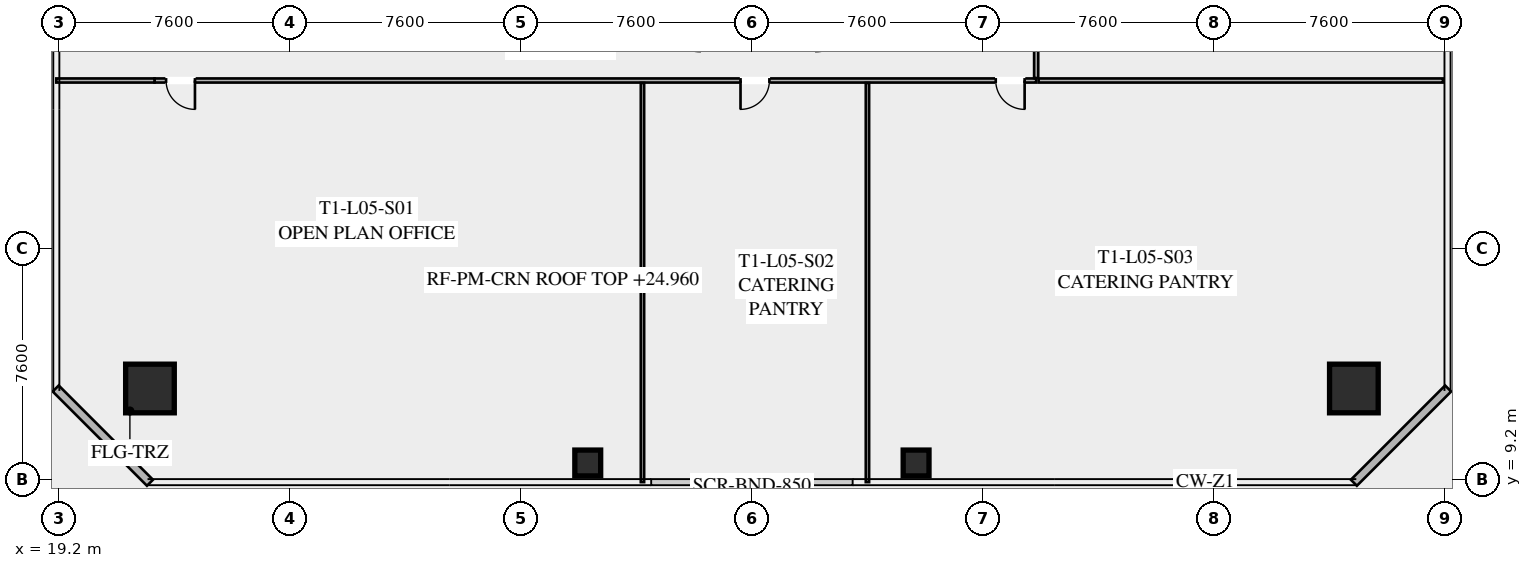
"""IFC4 building model, lengths in metres.
Left out: names, types, materials, properties, quantities, classifications, styles, units other than length and angle.
Written with IfcOpenShell. Run it as: python <this file> out.ifc"""

import sys

from ifc_helpers import new_model, si_unit, direction, frame, frame_2d, origin, origin_2d, place, context, subcontext, project, spatial, rectangle, hollow_rectangle, extrude, element, fill, save


model = new_model("IFC4")
c1 = context("Model", 3, precision=1e-05, world=origin(), true_north=direction((0.0, 1.0)))
c2 = subcontext(c1, "Body", "Model", "MODEL_VIEW")
j1 = project(units=[si_unit("LENGTHUNIT", "METRE"), si_unit("PLANEANGLEUNIT", "RADIAN")], contexts=[c1])
p1 = place(None, origin())
s1 = spatial("IfcSite", under=j1, at=p1, CompositionType="ELEMENT")
p2 = place(p1, origin())
s2 = spatial("IfcBuilding", under=s1, at=p2, CompositionType="ELEMENT")
p3 = place(p2, frame((0.0, 0.0, 24.6)))
s3 = spatial("IfcBuildingStorey", under=s2, at=p3, CompositionType="ELEMENT", Elevation=24.6)
for number, where, z_axis, x_axis in (
    (1, (22.2, 12.2, 0.0), (0.0, 0.0, 1.0), (1.0, 0.0, 0.0)),
    (2, (61.8, 12.2, 0.0), (0.0, 0.0, 1.0), (1.0, 0.0, 0.0)),
):
    element("IfcColumn", number, at=place(p3, frame(where, z_axis=z_axis, x_axis=x_axis)), inside=s3, PredefinedType="COLUMN", context=c2, shape_type="SweptSolid", body=[
        extrude(hollow_rectangle(XDim=1.6, YDim=1.6, WallThickness=0.06, at=origin_2d()), origin(), (0.0, 0.0, 1.0), 3.35),
    ])
for number, where, z_axis, x_axis in (
    (3, (36.6, 9.75, 0.0), (0.0, 0.0, 1.0), (1.0, 0.0, 0.0)),
    (4, (47.4, 9.75, 0.0), (0.0, 0.0, 1.0), (1.0, 0.0, 0.0)),
):
    element("IfcColumn", number, at=place(p3, frame(where, z_axis=z_axis, x_axis=x_axis)), inside=s3, PredefinedType="COLUMN", context=c2, shape_type="SweptSolid", body=[
        extrude(hollow_rectangle(XDim=0.85, YDim=0.85, WallThickness=0.035, at=origin_2d()), origin(), (0.0, 0.0, 1.0), 3.35),
    ])
for number, where, z_axis, x_axis in (
    (5, (22.2, 9.1, 0.0), (0.0, 0.0, 1.0), (-0.707, 0.707, 0.0)),
    (6, (64.9, 12.2, 0.0), (0.0, 0.0, 1.0), (-0.707, -0.707, 0.0)),
):
    element("IfcWall", number, at=place(p3, frame(where, z_axis=z_axis, x_axis=x_axis)), inside=s3, PredefinedType="SOLIDWALL", context=c2, shape_type="SweptSolid", body=[
        extrude(rectangle(XDim=4.384, YDim=0.28, at=frame_2d((2.192, 0.0))), origin(), (0.0, 0.0, 1.0), 3.35),
    ])
p4 = place(p3, frame((51.35, 22.33, 0.0), z_axis=(0.0, 0.0, 1.0), x_axis=(-1.0, 0.0, 0.0)))
e7 = element("IfcWall", 7, at=p4, inside=s3, PredefinedType="PARTITIONING", context=c2, shape_type="SweptSolid", body=[
    extrude(rectangle(XDim=29.0, YDim=0.135, at=frame_2d((14.5, 0.0))), origin(), (0.0, 0.0, 1.0), 2.703),
])
p5 = place(p4, frame((27.67, 0.0, 0.0)))
e8 = element("IfcOpeningElement", 8, at=p5, cuts=e7, PredefinedType="OPENING", context=c2, shape_type="SweptSolid", body=[
    extrude(rectangle(XDim=0.95, YDim=2.05, at=frame_2d((0.475, 1.025))), frame((0.0, 0.077, 0.0), z_axis=(0.0, -1.0, 0.0), x_axis=(1.0, 0.0, 0.0)), (0.0, 0.0, 1.0), 0.155),
])
p6 = place(p4, frame((8.775, 0.0, 0.0)))
e9 = element("IfcOpeningElement", 9, at=p6, cuts=e7, PredefinedType="OPENING", context=c2, shape_type="SweptSolid", body=[
    extrude(rectangle(XDim=0.95, YDim=2.05, at=frame_2d((0.475, 1.025))), frame((0.0, 0.077, 0.0), z_axis=(0.0, -1.0, 0.0), x_axis=(1.0, 0.0, 0.0)), (0.0, 0.0, 1.0), 0.155),
])
p7 = place(p4, frame((0.38, 0.0, 0.0)))
e10 = element("IfcOpeningElement", 10, at=p7, cuts=e7, PredefinedType="OPENING", context=c2, shape_type="SweptSolid", body=[
    extrude(rectangle(XDim=0.95, YDim=2.05, at=frame_2d((0.475, 1.025))), frame((0.0, 0.077, 0.0), z_axis=(0.0, -1.0, 0.0), x_axis=(1.0, 0.0, 0.0)), (0.0, 0.0, 1.0), 0.155),
])
p8 = place(p3, frame((19.12, 22.33, 0.0), z_axis=(0.0, 0.0, 1.0), x_axis=(1.0, 0.0, 0.0)))
e11 = element("IfcWall", 11, at=p8, inside=s3, PredefinedType="PARTITIONING", context=c2, shape_type="SweptSolid", body=[
    extrude(rectangle(XDim=3.23, YDim=0.135, at=frame_2d((1.615, 0.0))), origin(), (0.0, 0.0, 1.0), 2.703),
])
for number, where, z_axis, x_axis in (
    (12, (38.4, 9.12, 0.0), (0.0, 0.0, 1.0), (0.0, 1.0, 0.0)),
    (13, (45.8, 9.12, 0.0), (0.0, 0.0, 1.0), (0.0, 1.0, 0.0)),
):
    element("IfcWall", number, at=place(p3, frame(where, z_axis=z_axis, x_axis=x_axis)), inside=s3, PredefinedType="PARTITIONING", context=c2, shape_type="SweptSolid", body=[
        extrude(rectangle(XDim=13.13, YDim=0.11, at=frame_2d((6.565, 0.0))), origin(), (0.0, 0.0, 1.0), 2.703),
    ])
p9 = place(p3, frame((51.35, 41.27, 0.0), z_axis=(0.0, 0.0, 1.0), x_axis=(0.0, -1.0, 0.0)))
e14 = element("IfcWall", 14, at=p9, inside=s3, PredefinedType="PARTITIONING", context=c2, shape_type="SweptSolid", body=[
    extrude(rectangle(XDim=18.86, YDim=0.135, at=frame_2d((9.43, 0.0))), origin(), (0.0, 0.0, 1.0), 2.703),
])
p10 = place(p9, frame((8.579, 0.0, 0.0)))
e15 = element("IfcOpeningElement", 15, at=p10, cuts=e14, PredefinedType="OPENING", context=c2, shape_type="SweptSolid", body=[
    extrude(rectangle(XDim=0.95, YDim=2.05, at=frame_2d((0.475, 1.025))), frame((0.0, 0.077, 0.0), z_axis=(0.0, -1.0, 0.0), x_axis=(1.0, 0.0, 0.0)), (0.0, 0.0, 1.0), 0.155),
])
p11 = place(p3, frame((51.43, 22.33, 0.0), z_axis=(0.0, 0.0, 1.0), x_axis=(1.0, 0.0, 0.0)))
e16 = element("IfcWall", 16, at=p11, inside=s3, PredefinedType="PARTITIONING", context=c2, shape_type="SweptSolid", body=[
    extrude(rectangle(XDim=13.3, YDim=0.135, at=frame_2d((6.65, 0.0))), origin(), (0.0, 0.0, 1.0), 2.703),
])
p12 = place(p5, origin())
e17 = element("IfcDoor", 17, at=p12, inside=s3, OperationType="SINGLE_SWING_LEFT", PredefinedType="DOOR", context=c2, shape_type="SweptSolid", body=[
    extrude(rectangle(XDim=0.95, YDim=2.05, at=frame_2d((0.475, 1.025))), frame((0.0, 0.025, 0.0), z_axis=(0.0, -1.0, 0.0), x_axis=(1.0, 0.0, 0.0)), (0.0, 0.0, 1.0), 0.05),
])
fill(e8, e17)
p13 = place(p6, origin())
e18 = element("IfcDoor", 18, at=p13, inside=s3, OperationType="SINGLE_SWING_RIGHT", PredefinedType="DOOR", context=c2, shape_type="SweptSolid", body=[
    extrude(rectangle(XDim=0.95, YDim=2.05, at=frame_2d((0.475, 1.025))), frame((0.0, 0.025, 0.0), z_axis=(0.0, -1.0, 0.0), x_axis=(1.0, 0.0, 0.0)), (0.0, 0.0, 1.0), 0.05),
])
fill(e9, e18)
p14 = place(p7, origin())
e19 = element("IfcDoor", 19, at=p14, inside=s3, OperationType="SINGLE_SWING_LEFT", PredefinedType="DOOR", context=c2, shape_type="SweptSolid", body=[
    extrude(rectangle(XDim=0.95, YDim=2.05, at=frame_2d((0.475, 1.025))), frame((0.0, 0.025, 0.0), z_axis=(0.0, -1.0, 0.0), x_axis=(1.0, 0.0, 0.0)), (0.0, 0.0, 1.0), 0.05),
])
fill(e10, e19)
save(model, sys.argv[1])
